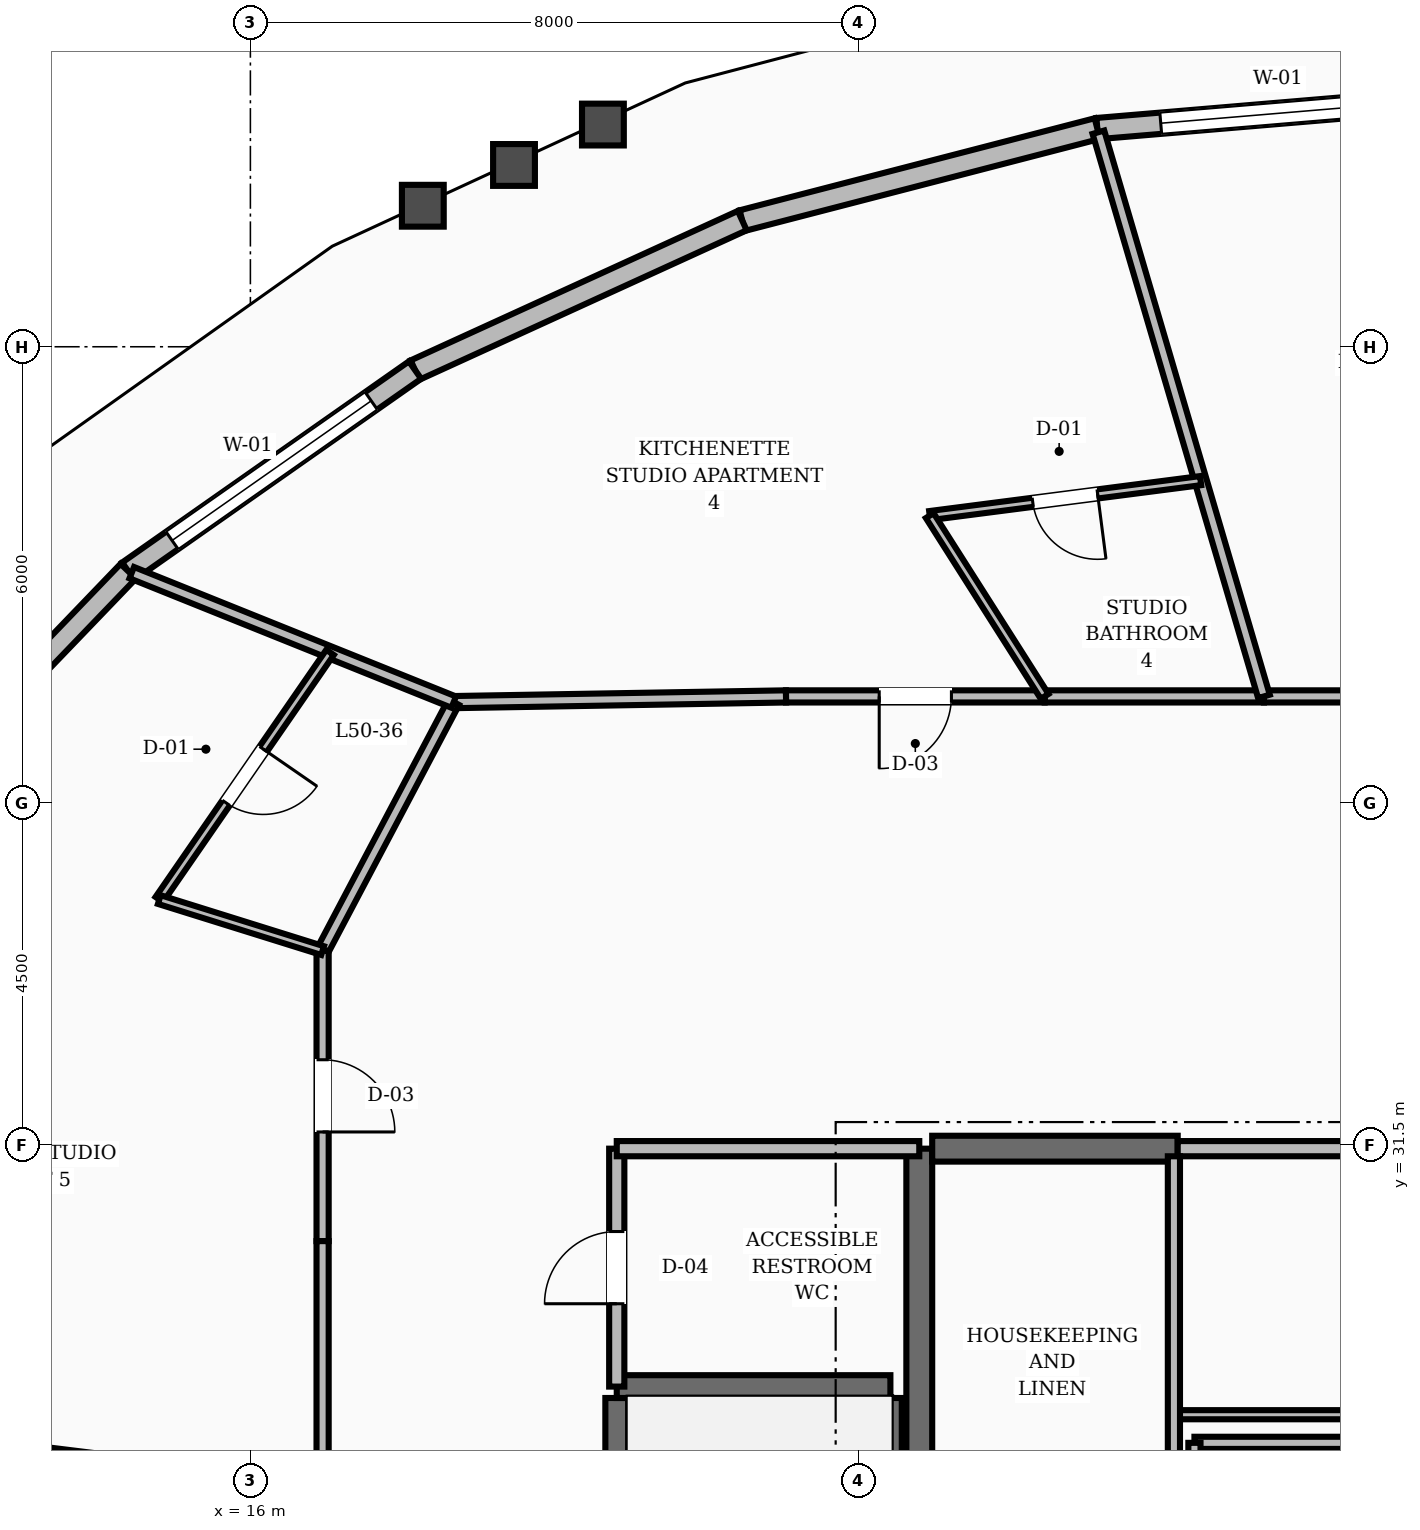
"""IFC4 building model, lengths in metres.
Left out: names, types, materials, properties, quantities, classifications, styles, units other than length and angle.
Written with IfcOpenShell. Run it as: python <this file> out.ifc"""

import sys

from ifc_helpers import new_model, si_unit, direction, frame, frame_2d, origin, place, context, subcontext, project, spatial, rectangle, extrude, element, fill, save


model = new_model("IFC4")
c1 = context("Model", 3, precision=1e-05, world=origin(), true_north=direction((0.0, 1.0)))
c2 = subcontext(c1, "Body", "Model", "MODEL_VIEW")
j1 = project(units=[si_unit("LENGTHUNIT", "METRE"), si_unit("PLANEANGLEUNIT", "RADIAN")], contexts=[c1])
p1 = place(None, origin())
s1 = spatial("IfcSite", under=j1, at=p1, CompositionType="ELEMENT")
p2 = place(p1, origin())
s2 = spatial("IfcBuilding", under=s1, at=p2, CompositionType="ELEMENT")
p3 = place(p2, frame((0.0, 0.0, 192.8)))
s3 = spatial("IfcBuildingStorey", under=s2, at=p3, CompositionType="ELEMENT", Elevation=192.8)
p4 = place(p3, frame((24.8, 25.15, 0.0), z_axis=(0.0, 0.0, 1.0), x_axis=(0.0, 1.0, 0.0)))
e1 = element("IfcWall", 1, at=p4, inside=s3, PredefinedType="SHEAR", context=c2, shape_type="SweptSolid", body=[
    extrude(rectangle(XDim=6.3, YDim=0.34, at=frame_2d((3.15, 0.0))), origin(), (0.0, 0.0, 1.0), 3.6),
])
p5 = place(p3, frame((24.97, 31.45, 0.0), z_axis=(0.0, 0.0, 1.0), x_axis=(1.0, 0.0, 0.0)))
e2 = element("IfcWall", 2, at=p5, inside=s3, PredefinedType="SHEAR", context=c2, shape_type="SweptSolid", body=[
    extrude(rectangle(XDim=3.23, YDim=0.34, at=frame_2d((1.615, 0.0))), origin(), (0.0, 0.0, 1.0), 3.6),
])
for number, where, z_axis, x_axis in (
    (3, (20.82, 19.43, 0.0), (0.0, 0.0, 1.0), (0.0, 1.0, 0.0)),
    (4, (24.42, 19.43, 0.0), (0.0, 0.0, 1.0), (0.0, 1.0, 0.0)),
):
    element("IfcWall", number, at=place(p3, frame(where, z_axis=z_axis, x_axis=x_axis)), inside=s3, PredefinedType="SHEAR", context=c2, shape_type="SweptSolid", body=[
        extrude(rectangle(XDim=8.74, YDim=0.3, at=frame_2d((4.37, 0.0))), origin(), (0.0, 0.0, 1.0), 3.6),
    ])
p6 = place(p3, frame((20.82, 28.32, 0.0), z_axis=(0.0, 0.0, 1.0), x_axis=(1.0, 0.0, 0.0)))
e5 = element("IfcWall", 5, at=p6, inside=s3, PredefinedType="SHEAR", context=c2, shape_type="SweptSolid", body=[
    extrude(rectangle(XDim=3.6, YDim=0.3, at=frame_2d((1.8, 0.0))), origin(), (0.0, 0.0, 1.0), 3.6),
])
p7 = place(p3, frame((32.0, 45.279, 0.0), z_axis=(0.0, 0.0, 1.0), x_axis=(-0.996479473867, -0.083837092992, 0.0)))
e6 = element("IfcWall", 6, at=p7, inside=s3, PredefinedType="STANDARD", context=c2, shape_type="SweptSolid", body=[
    extrude(rectangle(XDim=4.875, YDim=0.28, at=frame_2d((2.438, 0.0))), origin(), (0.0, 0.0, 1.0), 2.82),
])
p8 = place(p7, frame((0.837, 0.0, 0.8)))
e7 = element("IfcOpeningElement", 7, at=p8, cuts=e6, PredefinedType="OPENING", context=c2, shape_type="SweptSolid", body=[
    extrude(rectangle(XDim=3.2, YDim=1.65, at=frame_2d((1.6, 0.825))), frame((0.0, 0.15, 0.0), z_axis=(0.0, -1.0, 0.0), x_axis=(1.0, 0.0, 0.0)), (0.0, 0.0, 1.0), 0.3),
])
p9 = place(p3, frame((27.142, 44.871, 0.0), z_axis=(0.0, 0.0, 1.0), x_axis=(-0.968001905281, -0.250942844833, 0.0)))
e8 = element("IfcWall", 8, at=p9, inside=s3, PredefinedType="STANDARD", context=c2, shape_type="SweptSolid", body=[
    extrude(rectangle(XDim=4.825, YDim=0.28, at=frame_2d((2.413, 0.0))), origin(), (0.0, 0.0, 1.0), 2.82),
])
p10 = place(p3, frame((22.471, 43.66, 0.0), z_axis=(0.0, 0.0, 1.0), x_axis=(-0.909587572303, -0.415512272155, 0.0)))
e9 = element("IfcWall", 9, at=p10, inside=s3, PredefinedType="STANDARD", context=c2, shape_type="SweptSolid", body=[
    extrude(rectangle(XDim=4.733, YDim=0.28, at=frame_2d((2.366, 0.0))), origin(), (0.0, 0.0, 1.0), 2.82),
])
p11 = place(p3, frame((18.166, 41.693, 0.0), z_axis=(0.0, 0.0, 1.0), x_axis=(-0.818721405334, -0.574190961657, 0.0)))
e10 = element("IfcWall", 10, at=p11, inside=s3, PredefinedType="STANDARD", context=c2, shape_type="SweptSolid", body=[
    extrude(rectangle(XDim=4.609, YDim=0.28, at=frame_2d((2.304, 0.0))), origin(), (0.0, 0.0, 1.0), 2.82),
])
p12 = place(p11, frame((0.704, 0.0, 0.8)))
e11 = element("IfcOpeningElement", 11, at=p12, cuts=e10, PredefinedType="OPENING", context=c2, shape_type="SweptSolid", body=[
    extrude(rectangle(XDim=3.2, YDim=1.65, at=frame_2d((1.6, 0.825))), frame((0.0, 0.15, 0.0), z_axis=(0.0, -1.0, 0.0), x_axis=(1.0, 0.0, 0.0)), (0.0, 0.0, 1.0), 0.3),
])
p13 = place(p3, frame((14.393, 39.047, 0.0), z_axis=(0.0, 0.0, 1.0), x_axis=(-0.692654585046, -0.721269454375, 0.0)))
e12 = element("IfcWall", 12, at=p13, inside=s3, PredefinedType="STANDARD", context=c2, shape_type="SweptSolid", body=[
    extrude(rectangle(XDim=4.471, YDim=0.28, at=frame_2d((2.235, 0.0))), origin(), (0.0, 0.0, 1.0), 2.82),
])
p14 = place(p3, frame((20.82, 28.32, 0.0), z_axis=(0.0, 0.0, 1.0), x_axis=(0.0, 1.0, 0.0)))
e13 = element("IfcWall", 13, at=p14, inside=s3, PredefinedType="SOLIDWALL", context=c2, shape_type="SweptSolid", body=[
    extrude(rectangle(XDim=3.13, YDim=0.2, at=frame_2d((1.565, 0.0))), origin(), (0.0, 0.0, 1.0), 2.8),
])
p15 = place(p14, frame((1.09, 0.0, 0.0)))
e14 = element("IfcOpeningElement", 14, at=p15, cuts=e13, PredefinedType="OPENING", context=c2, shape_type="SweptSolid", body=[
    extrude(rectangle(XDim=0.95, YDim=2.1, at=frame_2d((0.475, 1.05))), frame((0.0, 0.11, 0.0), z_axis=(0.0, -1.0, 0.0), x_axis=(1.0, 0.0, 0.0)), (0.0, 0.0, 1.0), 0.22),
])
p16 = place(p3, frame((20.82, 31.45, 0.0), z_axis=(0.0, 0.0, 1.0), x_axis=(1.0, 0.0, 0.0)))
e15 = element("IfcWall", 15, at=p16, inside=s3, PredefinedType="SOLIDWALL", context=c2, shape_type="SweptSolid", body=[
    extrude(rectangle(XDim=3.98, YDim=0.2, at=frame_2d((1.99, 0.0))), origin(), (0.0, 0.0, 1.0), 2.8),
])
p17 = place(p3, frame((28.42, 27.58, 0.0), z_axis=(0.0, 0.0, 1.0), x_axis=(1.0, 0.0, 0.0)))
e16 = element("IfcWall", 16, at=p17, inside=s3, PredefinedType="SOLIDWALL", context=c2, shape_type="SweptSolid", body=[
    extrude(rectangle(XDim=4.66, YDim=0.16, at=frame_2d((2.33, 0.0))), origin(), (0.0, 0.0, 1.0), 2.8),
])
p18 = place(p3, frame((28.42, 25.42, 0.0), z_axis=(0.0, 0.0, 1.0), x_axis=(0.0, 1.0, 0.0)))
e17 = element("IfcWall", 17, at=p18, inside=s3, PredefinedType="SOLIDWALL", context=c2, shape_type="SweptSolid", body=[
    extrude(rectangle(XDim=2.16, YDim=0.16, at=frame_2d((1.08, 0.0))), origin(), (0.0, 0.0, 1.0), 2.8),
])
p19 = place(p3, frame((28.2, 31.45, 0.0), z_axis=(0.0, 0.0, 1.0), x_axis=(1.0, 0.0, 0.0)))
e18 = element("IfcWall", 18, at=p19, inside=s3, PredefinedType="SOLIDWALL", context=c2, shape_type="SweptSolid", body=[
    extrude(rectangle(XDim=7.6, YDim=0.2, at=frame_2d((3.8, 0.0))), origin(), (0.0, 0.0, 1.0), 2.8),
])
p20 = place(p3, frame((28.2, 27.95, 0.0), z_axis=(0.0, 0.0, 1.0), x_axis=(1.0, 0.0, 0.0)))
e19 = element("IfcWall", 19, at=p20, inside=s3, PredefinedType="PARTITIONING", context=c2, shape_type="SweptSolid", body=[
    extrude(rectangle(XDim=7.6, YDim=0.12, at=frame_2d((3.8, 0.0))), origin(), (0.0, 0.0, 1.0), 2.8),
])
p21 = place(p3, frame((28.15, 25.25, 0.0), z_axis=(0.0, 0.0, 1.0), x_axis=(0.0, 1.0, 0.0)))
e20 = element("IfcWall", 20, at=p21, inside=s3, PredefinedType="SOLIDWALL", context=c2, shape_type="SweptSolid", body=[
    extrude(rectangle(XDim=6.1, YDim=0.16, at=frame_2d((3.05, 0.0))), origin(), (0.0, 0.0, 1.0), 2.8),
])
p22 = place(p3, frame((32.0, 37.4, 0.0), z_axis=(0.0, 0.0, 1.0), x_axis=(-1.0, 0.0, 0.0)))
e21 = element("IfcWall", 21, at=p22, inside=s3, PredefinedType="SOLIDWALL", context=c2, shape_type="SweptSolid", body=[
    extrude(rectangle(XDim=2.665, YDim=0.16, at=frame_2d((1.333, 0.0))), origin(), (0.0, 0.0, 1.0), 2.8),
])
p23 = place(p3, frame((29.335, 37.4, 0.0), z_axis=(0.0, 0.0, 1.0), x_axis=(-1.0, 0.0, 0.0)))
e22 = element("IfcWall", 22, at=p23, inside=s3, PredefinedType="SOLIDWALL", context=c2, shape_type="SweptSolid", body=[
    extrude(rectangle(XDim=2.885, YDim=0.16, at=frame_2d((1.443, 0.0))), origin(), (0.0, 0.0, 1.0), 2.8),
])
p24 = place(p3, frame((26.449, 37.4, 0.0), z_axis=(0.0, 0.0, 1.0), x_axis=(-1.0, 0.0, 0.0)))
e23 = element("IfcWall", 23, at=p24, inside=s3, PredefinedType="SOLIDWALL", context=c2, shape_type="SweptSolid", body=[
    extrude(rectangle(XDim=3.403, YDim=0.16, at=frame_2d((1.702, 0.0))), origin(), (0.0, 0.0, 1.0), 2.8),
])
p25 = place(p24, frame((1.227, 0.0, 0.0)))
e24 = element("IfcOpeningElement", 24, at=p25, cuts=e23, PredefinedType="OPENING", context=c2, shape_type="SweptSolid", body=[
    extrude(rectangle(XDim=0.95, YDim=2.1, at=frame_2d((0.475, 1.05))), frame((0.0, 0.09, 0.0), z_axis=(0.0, -1.0, 0.0), x_axis=(1.0, 0.0, 0.0)), (0.0, 0.0, 1.0), 0.18),
])
p26 = place(p3, frame((23.046, 37.4, 0.0), z_axis=(0.0, 0.0, 1.0), x_axis=(-0.999853038912, -0.017143528788, 0.0)))
e25 = element("IfcWall", 25, at=p26, inside=s3, PredefinedType="SOLIDWALL", context=c2, shape_type="SweptSolid", body=[
    extrude(rectangle(XDim=4.372, YDim=0.16, at=frame_2d((2.186, 0.0))), origin(), (0.0, 0.0, 1.0), 2.8),
])
p27 = place(p3, frame((18.675, 37.325, 0.0), z_axis=(0.0, 0.0, 1.0), x_axis=(-0.466737093093, -0.884396113702, 0.0)))
e26 = element("IfcWall", 26, at=p27, inside=s3, PredefinedType="SOLIDWALL", context=c2, shape_type="SweptSolid", body=[
    extrude(rectangle(XDim=3.696, YDim=0.16, at=frame_2d((1.848, 0.0))), origin(), (0.0, 0.0, 1.0), 2.8),
])
p28 = place(p3, frame((16.95, 34.056, 0.0), z_axis=(0.0, 0.0, 1.0), x_axis=(0.0, -1.0, 0.0)))
e27 = element("IfcWall", 27, at=p28, inside=s3, PredefinedType="SOLIDWALL", context=c2, shape_type="SweptSolid", body=[
    extrude(rectangle(XDim=3.822, YDim=0.16, at=frame_2d((1.911, 0.0))), origin(), (0.0, 0.0, 1.0), 2.8),
])
p29 = place(p28, frame((1.436, 0.0, 0.0)))
e28 = element("IfcOpeningElement", 28, at=p29, cuts=e27, PredefinedType="OPENING", context=c2, shape_type="SweptSolid", body=[
    extrude(rectangle(XDim=0.95, YDim=2.1, at=frame_2d((0.475, 1.05))), frame((0.0, 0.09, 0.0), z_axis=(0.0, -1.0, 0.0), x_axis=(1.0, 0.0, 0.0)), (0.0, 0.0, 1.0), 0.18),
])
p30 = place(p3, frame((16.95, 30.234, 0.0), z_axis=(0.0, 0.0, 1.0), x_axis=(0.0, -1.0, 0.0)))
e29 = element("IfcWall", 29, at=p30, inside=s3, PredefinedType="SOLIDWALL", context=c2, shape_type="SweptSolid", body=[
    extrude(rectangle(XDim=3.24, YDim=0.16, at=frame_2d((1.62, 0.0))), origin(), (0.0, 0.0, 1.0), 2.8),
])
p31 = place(p3, frame((29.335, 37.4, 0.0), z_axis=(0.0, 0.0, 1.0), x_axis=(-0.281583607125, 0.95953669664, 0.0)))
e30 = element("IfcWall", 30, at=p31, inside=s3, PredefinedType="SOLIDWALL", context=c2, shape_type="SweptSolid", body=[
    extrude(rectangle(XDim=7.736, YDim=0.16, at=frame_2d((3.868, 0.0))), origin(), (0.0, 0.0, 1.0), 2.8),
])
p32 = place(p3, frame((28.501, 40.239, 0.0), z_axis=(0.0, 0.0, 1.0), x_axis=(-0.991764787462, -0.128072660435, 0.0)))
e31 = element("IfcWall", 31, at=p32, inside=s3, PredefinedType="PARTITIONING", context=c2, shape_type="SweptSolid", body=[
    extrude(rectangle(XDim=3.593, YDim=0.12, at=frame_2d((1.797, 0.0))), origin(), (0.0, 0.0, 1.0), 2.8),
])
p33 = place(p32, frame((1.367, 0.0, 0.0)))
e32 = element("IfcOpeningElement", 32, at=p33, cuts=e31, PredefinedType="OPENING", context=c2, shape_type="SweptSolid", body=[
    extrude(rectangle(XDim=0.86, YDim=2.1, at=frame_2d((0.43, 1.05))), frame((0.0, 0.07, 0.0), z_axis=(0.0, -1.0, 0.0), x_axis=(1.0, 0.0, 0.0)), (0.0, 0.0, 1.0), 0.14),
])
p34 = place(p3, frame((26.449, 37.4, 0.0), z_axis=(0.0, 0.0, 1.0), x_axis=(-0.536376545324, 0.843978792166, 0.0)))
e33 = element("IfcWall", 33, at=p34, inside=s3, PredefinedType="PARTITIONING", context=c2, shape_type="SweptSolid", body=[
    extrude(rectangle(XDim=2.818, YDim=0.12, at=frame_2d((1.409, 0.0))), origin(), (0.0, 0.0, 1.0), 2.8),
])
p35 = place(p3, frame((18.675, 37.325, 0.0), z_axis=(0.0, 0.0, 1.0), x_axis=(-0.927803923055, 0.373068198007, 0.0)))
e34 = element("IfcWall", 34, at=p35, inside=s3, PredefinedType="SOLIDWALL", context=c2, shape_type="SweptSolid", body=[
    extrude(rectangle(XDim=4.565, YDim=0.16, at=frame_2d((2.283, 0.0))), origin(), (0.0, 0.0, 1.0), 2.8),
])
p36 = place(p3, frame((17.048, 37.979, 0.0), z_axis=(0.0, 0.0, 1.0), x_axis=(-0.568352045018, -0.822785484147, 0.0)))
e35 = element("IfcWall", 35, at=p36, inside=s3, PredefinedType="PARTITIONING", context=c2, shape_type="SweptSolid", body=[
    extrude(rectangle(XDim=3.952, YDim=0.12, at=frame_2d((1.976, 0.0))), origin(), (0.0, 0.0, 1.0), 2.8),
])
p37 = place(p36, frame((1.546, 0.0, 0.0)))
e36 = element("IfcOpeningElement", 36, at=p37, cuts=e35, PredefinedType="OPENING", context=c2, shape_type="SweptSolid", body=[
    extrude(rectangle(XDim=0.86, YDim=2.1, at=frame_2d((0.43, 1.05))), frame((0.0, 0.07, 0.0), z_axis=(0.0, -1.0, 0.0), x_axis=(1.0, 0.0, 0.0)), (0.0, 0.0, 1.0), 0.14),
])
p38 = place(p3, frame((16.95, 34.056, 0.0), z_axis=(0.0, 0.0, 1.0), x_axis=(-0.954510853245, 0.298176174497, 0.0)))
e37 = element("IfcWall", 37, at=p38, inside=s3, PredefinedType="PARTITIONING", context=c2, shape_type="SweptSolid", body=[
    extrude(rectangle(XDim=2.251, YDim=0.12, at=frame_2d((1.125, 0.0))), origin(), (0.0, 0.0, 1.0), 2.8),
])
p39 = place(p3, frame((16.95, 26.994, 0.0), z_axis=(0.0, 0.0, 1.0), x_axis=(-0.992455591893, 0.122604641515, 0.0)))
e38 = element("IfcWall", 38, at=p39, inside=s3, PredefinedType="SOLIDWALL", context=c2, shape_type="SweptSolid", body=[
    extrude(rectangle(XDim=9.393, YDim=0.16, at=frame_2d((4.696, 0.0))), origin(), (0.0, 0.0, 1.0), 2.8),
])
p40 = place(p8, origin())
e39 = element("IfcWindow", 39, at=p40, inside=s3, PartitioningType="SINGLE_PANEL", PredefinedType="WINDOW", context=c2, shape_type="SweptSolid", body=[
    extrude(rectangle(XDim=3.2, YDim=1.65, at=frame_2d((1.6, 0.825))), frame((0.0, 0.03, 0.0), z_axis=(0.0, -1.0, 0.0), x_axis=(1.0, 0.0, 0.0)), (0.0, 0.0, 1.0), 0.06),
])
fill(e7, e39)
p41 = place(p12, origin())
e40 = element("IfcWindow", 40, at=p41, inside=s3, PartitioningType="SINGLE_PANEL", PredefinedType="WINDOW", context=c2, shape_type="SweptSolid", body=[
    extrude(rectangle(XDim=3.2, YDim=1.65, at=frame_2d((1.6, 0.825))), frame((0.0, 0.03, 0.0), z_axis=(0.0, -1.0, 0.0), x_axis=(1.0, 0.0, 0.0)), (0.0, 0.0, 1.0), 0.06),
])
fill(e11, e40)
p42 = place(p15, origin())
e41 = element("IfcDoor", 41, at=p42, inside=s3, OperationType="SINGLE_SWING_LEFT", PredefinedType="DOOR", context=c2, shape_type="SweptSolid", body=[
    extrude(rectangle(XDim=0.95, YDim=2.1, at=frame_2d((0.475, 1.05))), frame((0.0, 0.025, 0.0), z_axis=(0.0, -1.0, 0.0), x_axis=(1.0, 0.0, 0.0)), (0.0, 0.0, 1.0), 0.05),
])
fill(e14, e41)
p43 = place(p33, origin())
e42 = element("IfcDoor", 42, at=p43, inside=s3, OperationType="SINGLE_SWING_LEFT", PredefinedType="DOOR", context=c2, shape_type="SweptSolid", body=[
    extrude(rectangle(XDim=0.86, YDim=2.1, at=frame_2d((0.43, 1.05))), frame((0.0, 0.025, 0.0), z_axis=(0.0, -1.0, 0.0), x_axis=(1.0, 0.0, 0.0)), (0.0, 0.0, 1.0), 0.05),
])
fill(e32, e42)
p44 = place(p25, origin())
e43 = element("IfcDoor", 43, at=p44, inside=s3, OperationType="SINGLE_SWING_RIGHT", PredefinedType="DOOR", context=c2, shape_type="SweptSolid", body=[
    extrude(rectangle(XDim=0.95, YDim=2.1, at=frame_2d((0.475, 1.05))), frame((0.0, 0.025, 0.0), z_axis=(0.0, -1.0, 0.0), x_axis=(1.0, 0.0, 0.0)), (0.0, 0.0, 1.0), 0.05),
])
fill(e24, e43)
p45 = place(p37, origin())
e44 = element("IfcDoor", 44, at=p45, inside=s3, OperationType="SINGLE_SWING_LEFT", PredefinedType="DOOR", context=c2, shape_type="SweptSolid", body=[
    extrude(rectangle(XDim=0.86, YDim=2.1, at=frame_2d((0.43, 1.05))), frame((0.0, 0.025, 0.0), z_axis=(0.0, -1.0, 0.0), x_axis=(1.0, 0.0, 0.0)), (0.0, 0.0, 1.0), 0.05),
])
fill(e36, e44)
p46 = place(p29, origin())
e45 = element("IfcDoor", 45, at=p46, inside=s3, OperationType="SINGLE_SWING_RIGHT", PredefinedType="DOOR", context=c2, shape_type="SweptSolid", body=[
    extrude(rectangle(XDim=0.95, YDim=2.1, at=frame_2d((0.475, 1.05))), frame((0.0, 0.025, 0.0), z_axis=(0.0, -1.0, 0.0), x_axis=(1.0, 0.0, 0.0)), (0.0, 0.0, 1.0), 0.05),
])
fill(e28, e45)
save(model, sys.argv[1])
